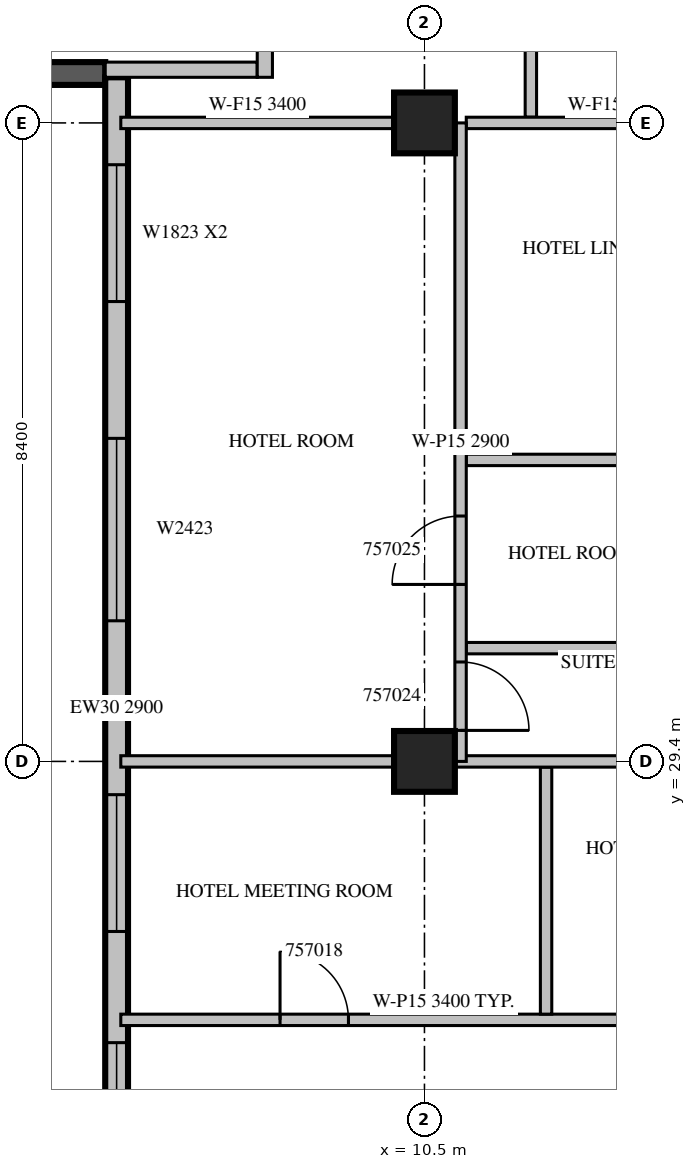
"""IFC4 building model, lengths in metres.
Left out: names, types, materials, properties, quantities, classifications, styles, units other than length and angle.
Written with IfcOpenShell. Run it as: python <this file> out.ifc"""

import sys

from ifc_helpers import new_model, si_unit, direction, frame, frame_2d, origin, origin_2d, place, context, subcontext, project, spatial, rectangle, extrude, source, transform, mapped, element, fill, save


model = new_model("IFC4")
c1 = context("Model", 3, precision=1e-05, world=origin(), true_north=direction((0.0, 1.0)))
c2 = subcontext(c1, "Body", "Model", "MODEL_VIEW")
j1 = project(units=[si_unit("LENGTHUNIT", "METRE"), si_unit("PLANEANGLEUNIT", "RADIAN")], contexts=[c1])
p1 = place(None, origin())
s1 = spatial("IfcSite", under=j1, at=p1, CompositionType="ELEMENT")
p2 = place(p1, origin())
s2 = spatial("IfcBuilding", under=s1, at=p2, CompositionType="ELEMENT")
p3 = place(p2, frame((0.0, 0.0, 250.0)))
s3 = spatial("IfcBuildingStorey", under=s2, at=p3, CompositionType="ELEMENT", Elevation=250.0)
m1 = source(origin(), c2, "Body", "SweptSolid", [
    extrude(rectangle(XDim=0.8, YDim=0.8, at=origin_2d()), origin(), (0.0, 0.0, 1.0), 3.8),
])
for number, where, z_axis, x_axis in (
    (1, (10.5, 29.4, 0.0), (0.0, 0.0, 1.0), (1.0, 0.0, 0.0)),
    (2, (10.5, 37.8, 0.0), (0.0, 0.0, 1.0), (1.0, 0.0, 0.0)),
):
    element("IfcColumn", number, at=place(p3, frame(where, z_axis=z_axis, x_axis=x_axis)), inside=s3, PredefinedType="COLUMN", context=c2, shape_type="MappedRepresentation", body=[
        mapped(m1, transform((0.0, 0.0, 0.0), scale=1.0)),
    ])
m2 = source(origin(), c2, "Body", "SweptSolid", [
    extrude(rectangle(XDim=6.1, YDim=0.3, at=frame_2d((3.05, 0.0))), origin(), (0.0, 0.0, 1.0), 3.4),
])
p4 = place(p3, frame((0.2, 38.45, 0.0), z_axis=(0.0, 0.0, 1.0), x_axis=(1.0, 0.0, 0.0)))
e3 = element("IfcWall", 3, at=p4, inside=s3, PredefinedType="SOLIDWALL", context=c2, shape_type="MappedRepresentation", body=[
    mapped(m2, transform((0.0, 0.0, 0.0), scale=1.0)),
])
m3 = source(origin(), c2, "Body", "SweptSolid", [
    extrude(rectangle(XDim=16.6, YDim=0.3, at=frame_2d((8.3, 0.0))), origin(), (0.0, 0.0, 1.0), 2.9),
])
p5 = place(p3, frame((6.45, 38.4, 0.0), z_axis=(0.0, 0.0, 1.0), x_axis=(0.0, -1.0, 0.0)))
e4 = element("IfcWall", 4, at=p5, inside=s3, PredefinedType="STANDARD", context=c2, shape_type="MappedRepresentation", body=[
    mapped(m3, transform((0.0, 0.0, 0.0), scale=1.0)),
])
m4 = source(origin(), c2, "Body", "SweptSolid", [
    extrude(rectangle(XDim=1.8, YDim=2.3, at=frame_2d((0.9, 1.15))), frame((0.0, 0.16, 0.0), z_axis=(0.0, -1.0, 0.0), x_axis=(1.0, 0.0, 0.0)), (0.0, 0.0, 1.0), 0.32),
])
p6 = place(p5, frame((1.15, 0.0, 0.6)))
e5 = element("IfcOpeningElement", 5, at=p6, cuts=e4, PredefinedType="OPENING", context=c2, shape_type="MappedRepresentation", body=[
    mapped(m4, transform((0.0, 0.0, 0.0), scale=1.0)),
])
m5 = source(origin(), c2, "Body", "SweptSolid", [
    extrude(rectangle(XDim=2.4, YDim=2.3, at=frame_2d((1.2, 1.15))), frame((0.0, 0.16, 0.0), z_axis=(0.0, -1.0, 0.0), x_axis=(1.0, 0.0, 0.0)), (0.0, 0.0, 1.0), 0.32),
])
p7 = place(p5, frame((4.75, 0.0, 0.6)))
e6 = element("IfcOpeningElement", 6, at=p7, cuts=e4, PredefinedType="OPENING", context=c2, shape_type="MappedRepresentation", body=[
    mapped(m5, transform((0.0, 0.0, 0.0), scale=1.0)),
])
p8 = place(p5, frame((9.438, 0.0, 0.6)))
e7 = element("IfcOpeningElement", 7, at=p8, cuts=e4, PredefinedType="OPENING", context=c2, shape_type="MappedRepresentation", body=[
    mapped(m4, transform((0.0, 0.0, 0.0), scale=1.0)),
])
m6 = source(origin(), c2, "Body", "SweptSolid", [
    extrude(rectangle(XDim=3.0, YDim=2.3, at=frame_2d((1.5, 1.15))), frame((0.0, 0.16, 0.0), z_axis=(0.0, -1.0, 0.0), x_axis=(1.0, 0.0, 0.0)), (0.0, 0.0, 1.0), 0.32),
])
p9 = place(p5, frame((12.7, 0.0, 0.6)))
e8 = element("IfcOpeningElement", 8, at=p9, cuts=e4, PredefinedType="OPENING", context=c2, shape_type="MappedRepresentation", body=[
    mapped(m6, transform((0.0, 0.0, 0.0), scale=1.0)),
])
m7 = source(origin(), c2, "Body", "SweptSolid", [
    extrude(rectangle(XDim=2.0, YDim=0.2, at=frame_2d((1.0, 0.0))), origin(), (0.0, 0.0, 1.0), 3.4),
])
p10 = place(p3, frame((6.3, 38.5, 0.0), z_axis=(0.0, 0.0, 1.0), x_axis=(1.0, 0.0, 0.0)))
e9 = element("IfcWall", 9, at=p10, inside=s3, PredefinedType="PARTITIONING", context=c2, shape_type="MappedRepresentation", body=[
    mapped(m7, transform((0.0, 0.0, 0.0), scale=1.0)),
])
m8 = source(origin(), c2, "Body", "SweptSolid", [
    extrude(rectangle(XDim=5.45, YDim=0.2, at=frame_2d((2.725, 0.0))), origin(), (0.0, 0.0, 1.0), 3.4),
])
p11 = place(p3, frame((8.4, 38.4, 0.0), z_axis=(0.0, 0.0, 1.0), x_axis=(0.0, 1.0, 0.0)))
e10 = element("IfcWall", 10, at=p11, inside=s3, PredefinedType="PARTITIONING", context=c2, shape_type="MappedRepresentation", body=[
    mapped(m8, transform((0.0, 0.0, 0.0), scale=1.0)),
])
m9 = source(origin(), c2, "Body", "SweptSolid", [
    extrude(rectangle(XDim=1.2, YDim=2.1, at=frame_2d((0.6, 1.05))), frame((0.0, 0.11, 0.0), z_axis=(0.0, -1.0, 0.0), x_axis=(1.0, 0.0, 0.0)), (0.0, 0.0, 1.0), 0.22),
])
p12 = place(p11, frame((0.4, 0.0, 0.0)))
e11 = element("IfcOpeningElement", 11, at=p12, cuts=e10, PredefinedType="OPENING", context=c2, shape_type="MappedRepresentation", body=[
    mapped(m9, transform((0.0, 0.0, 0.0), scale=1.0)),
])
m10 = source(origin(), c2, "Body", "SweptSolid", [
    extrude(rectangle(XDim=0.9, YDim=2.1, at=frame_2d((0.45, 1.05))), frame((0.0, 0.11, 0.0), z_axis=(0.0, -1.0, 0.0), x_axis=(1.0, 0.0, 0.0)), (0.0, 0.0, 1.0), 0.22),
])
p13 = place(p11, frame((3.25, 0.0, 0.0)))
e12 = element("IfcOpeningElement", 12, at=p13, cuts=e10, PredefinedType="OPENING", context=c2, shape_type="MappedRepresentation", body=[
    mapped(m10, transform((0.0, 0.0, 0.0), scale=1.0)),
])
m11 = source(origin(), c2, "Body", "SweptSolid", [
    extrude(rectangle(XDim=8.495, YDim=0.15, at=frame_2d((4.247, 0.0))), origin(), (0.0, 0.0, 1.0), 3.4),
])
p14 = place(p3, frame((6.505, 26.0, 0.0), z_axis=(0.0, 0.0, 1.0), x_axis=(1.0, 0.0, 0.0)))
e13 = element("IfcWall", 13, at=p14, inside=s3, PredefinedType="PARTITIONING", context=c2, shape_type="MappedRepresentation", body=[
    mapped(m11, transform((0.0, 0.0, 0.0), scale=1.0)),
])
m12 = source(origin(), c2, "Body", "SweptSolid", [
    extrude(rectangle(XDim=0.9, YDim=2.1, at=frame_2d((0.45, 1.05))), frame((0.0, 0.085, 0.0), z_axis=(0.0, -1.0, 0.0), x_axis=(1.0, 0.0, 0.0)), (0.0, 0.0, 1.0), 0.17),
])
p15 = place(p14, frame((2.095, 0.0, 0.0)))
e14 = element("IfcOpeningElement", 14, at=p15, cuts=e13, PredefinedType="OPENING", context=c2, shape_type="MappedRepresentation", body=[
    mapped(m12, transform((0.0, 0.0, 0.0), scale=1.0)),
])
p16 = place(p14, frame((7.17, 0.0, 0.0)))
e15 = element("IfcOpeningElement", 15, at=p16, cuts=e13, PredefinedType="OPENING", context=c2, shape_type="MappedRepresentation", body=[
    mapped(m12, transform((0.0, 0.0, 0.0), scale=1.0)),
])
m13 = source(origin(), c2, "Body", "SweptSolid", [
    extrude(rectangle(XDim=3.25, YDim=0.15, at=frame_2d((1.625, 0.0))), origin(), (0.0, 0.0, 1.0), 3.4),
])
p17 = place(p3, frame((12.1, 26.075, 0.0), z_axis=(0.0, 0.0, 1.0), x_axis=(0.0, 1.0, 0.0)))
e16 = element("IfcWall", 16, at=p17, inside=s3, PredefinedType="PARTITIONING", context=c2, shape_type="MappedRepresentation", body=[
    mapped(m13, transform((0.0, 0.0, 0.0), scale=1.0)),
])
m14 = source(origin(), c2, "Body", "SweptSolid", [
    extrude(rectangle(XDim=3.596, YDim=0.15, at=frame_2d((1.798, 0.0))), origin(), (0.0, 0.0, 1.0), 3.4),
])
p18 = place(p3, frame((10.101, 29.4, 0.0), z_axis=(0.0, 0.0, 1.0), x_axis=(-1.0, 0.0, 0.0)))
e17 = element("IfcWall", 17, at=p18, inside=s3, PredefinedType="PARTITIONING", context=c2, shape_type="MappedRepresentation", body=[
    mapped(m14, transform((0.0, 0.0, 0.0), scale=1.0)),
])
m15 = source(origin(), c2, "Body", "SweptSolid", [
    extrude(rectangle(XDim=4.101, YDim=0.15, at=frame_2d((2.05, 0.0))), origin(), (0.0, 0.0, 1.0), 3.4),
])
p19 = place(p3, frame((15.0, 29.4, 0.0), z_axis=(0.0, 0.0, 1.0), x_axis=(-1.0, 0.0, 0.0)))
e18 = element("IfcWall", 18, at=p19, inside=s3, PredefinedType="PARTITIONING", context=c2, shape_type="MappedRepresentation", body=[
    mapped(m15, transform((0.0, 0.0, 0.0), scale=1.0)),
])
m16 = source(origin(), c2, "Body", "SweptSolid", [
    extrude(rectangle(XDim=6.45, YDim=0.15, at=frame_2d((3.225, 0.0))), origin(), (0.0, 0.0, 1.0), 3.4),
])
p20 = place(p3, frame((11.9, 44.325, 0.0), z_axis=(0.0, 0.0, 1.0), x_axis=(0.0, -1.0, 0.0)))
e19 = element("IfcWall", 19, at=p20, inside=s3, PredefinedType="PARTITIONING", context=c2, shape_type="MappedRepresentation", body=[
    mapped(m16, transform((0.0, 0.0, 0.0), scale=1.0)),
])
m17 = source(origin(), c2, "Body", "SweptSolid", [
    extrude(rectangle(XDim=3.95, YDim=0.15, at=frame_2d((1.975, 0.0))), origin(), (0.0, 0.0, 1.0), 3.4),
])
for number, where, z_axis, x_axis in (
    (20, (15.0, 30.89, 0.0), (0.0, 0.0, 1.0), (-1.0, 0.0, 0.0)),
    (21, (15.0, 33.367, 0.0), (0.0, 0.0, 1.0), (-1.0, 0.0, 0.0)),
):
    element("IfcWall", number, at=place(p3, frame(where, z_axis=z_axis, x_axis=x_axis)), inside=s3, PredefinedType="PARTITIONING", context=c2, shape_type="MappedRepresentation", body=[
        mapped(m17, transform((0.0, 0.0, 0.0), scale=1.0)),
    ])
p21 = place(p3, frame((10.101, 37.8, 0.0), z_axis=(0.0, 0.0, 1.0), x_axis=(-1.0, 0.0, 0.0)))
e22 = element("IfcWall", 22, at=p21, inside=s3, PredefinedType="PARTITIONING", context=c2, shape_type="MappedRepresentation", body=[
    mapped(m14, transform((0.0, 0.0, 0.0), scale=1.0)),
])
p22 = place(p3, frame((15.0, 37.8, 0.0), z_axis=(0.0, 0.0, 1.0), x_axis=(-1.0, 0.0, 0.0)))
e23 = element("IfcWall", 23, at=p22, inside=s3, PredefinedType="PARTITIONING", context=c2, shape_type="MappedRepresentation", body=[
    mapped(m17, transform((0.0, 0.0, 0.0), scale=1.0)),
])
m18 = source(origin(), c2, "Body", "SweptSolid", [
    extrude(rectangle(XDim=8.4, YDim=0.15, at=frame_2d((4.2, 0.0))), origin(), (0.0, 0.0, 1.0), 2.9),
])
p23 = place(p3, frame((10.975, 29.4, 0.0), z_axis=(0.0, 0.0, 1.0), x_axis=(0.0, 1.0, 0.0)))
e24 = element("IfcWall", 24, at=p23, inside=s3, PredefinedType="PARTITIONING", context=c2, shape_type="MappedRepresentation", body=[
    mapped(m18, transform((0.0, 0.0, 0.0), scale=1.0)),
])
p24 = place(p23, frame((0.408, 0.0, 0.0)))
e25 = element("IfcOpeningElement", 25, at=p24, cuts=e24, PredefinedType="OPENING", context=c2, shape_type="MappedRepresentation", body=[
    mapped(m12, transform((0.0, 0.0, 0.0), scale=1.0)),
])
p25 = place(p23, frame((2.328, 0.0, 0.0)))
e26 = element("IfcOpeningElement", 26, at=p25, cuts=e24, PredefinedType="OPENING", context=c2, shape_type="MappedRepresentation", body=[
    mapped(m12, transform((0.0, 0.0, 0.0), scale=1.0)),
])
m19 = source(origin(), c2, "Body", "SweptSolid", [
    extrude(rectangle(XDim=1.8, YDim=2.3, at=frame_2d((0.9, 1.15))), frame((0.0, 0.03, 0.0), z_axis=(0.0, -1.0, 0.0), x_axis=(1.0, 0.0, 0.0)), (0.0, 0.0, 1.0), 0.06),
])
p26 = place(p6, origin())
e27 = element("IfcWindow", 27, at=p26, inside=s3, PartitioningType="SINGLE_PANEL", PredefinedType="WINDOW", context=c2, shape_type="MappedRepresentation", body=[
    mapped(m19, transform((0.0, 0.0, 0.0), scale=1.0)),
])
fill(e5, e27)
m20 = source(origin(), c2, "Body", "SweptSolid", [
    extrude(rectangle(XDim=2.4, YDim=2.3, at=frame_2d((1.2, 1.15))), frame((0.0, 0.03, 0.0), z_axis=(0.0, -1.0, 0.0), x_axis=(1.0, 0.0, 0.0)), (0.0, 0.0, 1.0), 0.06),
])
p27 = place(p7, origin())
e28 = element("IfcWindow", 28, at=p27, inside=s3, PartitioningType="SINGLE_PANEL", PredefinedType="WINDOW", context=c2, shape_type="MappedRepresentation", body=[
    mapped(m20, transform((0.0, 0.0, 0.0), scale=1.0)),
])
fill(e6, e28)
p28 = place(p8, origin())
e29 = element("IfcWindow", 29, at=p28, inside=s3, PartitioningType="SINGLE_PANEL", PredefinedType="WINDOW", context=c2, shape_type="MappedRepresentation", body=[
    mapped(m19, transform((0.0, 0.0, 0.0), scale=1.0)),
])
fill(e7, e29)
m21 = source(origin(), c2, "Body", "SweptSolid", [
    extrude(rectangle(XDim=3.0, YDim=2.3, at=frame_2d((1.5, 1.15))), frame((0.0, 0.03, 0.0), z_axis=(0.0, -1.0, 0.0), x_axis=(1.0, 0.0, 0.0)), (0.0, 0.0, 1.0), 0.06),
])
p29 = place(p9, origin())
e30 = element("IfcWindow", 30, at=p29, inside=s3, PartitioningType="SINGLE_PANEL", PredefinedType="WINDOW", context=c2, shape_type="MappedRepresentation", body=[
    mapped(m21, transform((0.0, 0.0, 0.0), scale=1.0)),
])
fill(e8, e30)
m22 = source(origin(), c2, "Body", "SweptSolid", [
    extrude(rectangle(XDim=0.9, YDim=2.1, at=frame_2d((0.45, 1.05))), frame((0.0, 0.025, 0.0), z_axis=(0.0, -1.0, 0.0), x_axis=(1.0, 0.0, 0.0)), (0.0, 0.0, 1.0), 0.05),
])
p30 = place(p15, origin())
e31 = element("IfcDoor", 31, at=p30, inside=s3, OperationType="SINGLE_SWING_LEFT", PredefinedType="DOOR", context=c2, shape_type="MappedRepresentation", body=[
    mapped(m22, transform((0.0, 0.0, 0.0), scale=1.0)),
])
fill(e14, e31)
p31 = place(p24, origin())
e32 = element("IfcDoor", 32, at=p31, inside=s3, OperationType="SINGLE_SWING_RIGHT", PredefinedType="DOOR", context=c2, shape_type="MappedRepresentation", body=[
    mapped(m22, transform((0.0, 0.0, 0.0), scale=1.0)),
])
fill(e25, e32)
p32 = place(p25, origin())
e33 = element("IfcDoor", 33, at=p32, inside=s3, OperationType="SINGLE_SWING_LEFT", PredefinedType="DOOR", context=c2, shape_type="MappedRepresentation", body=[
    mapped(m22, transform((0.0, 0.0, 0.0), scale=1.0)),
])
fill(e26, e33)
save(model, sys.argv[1])
